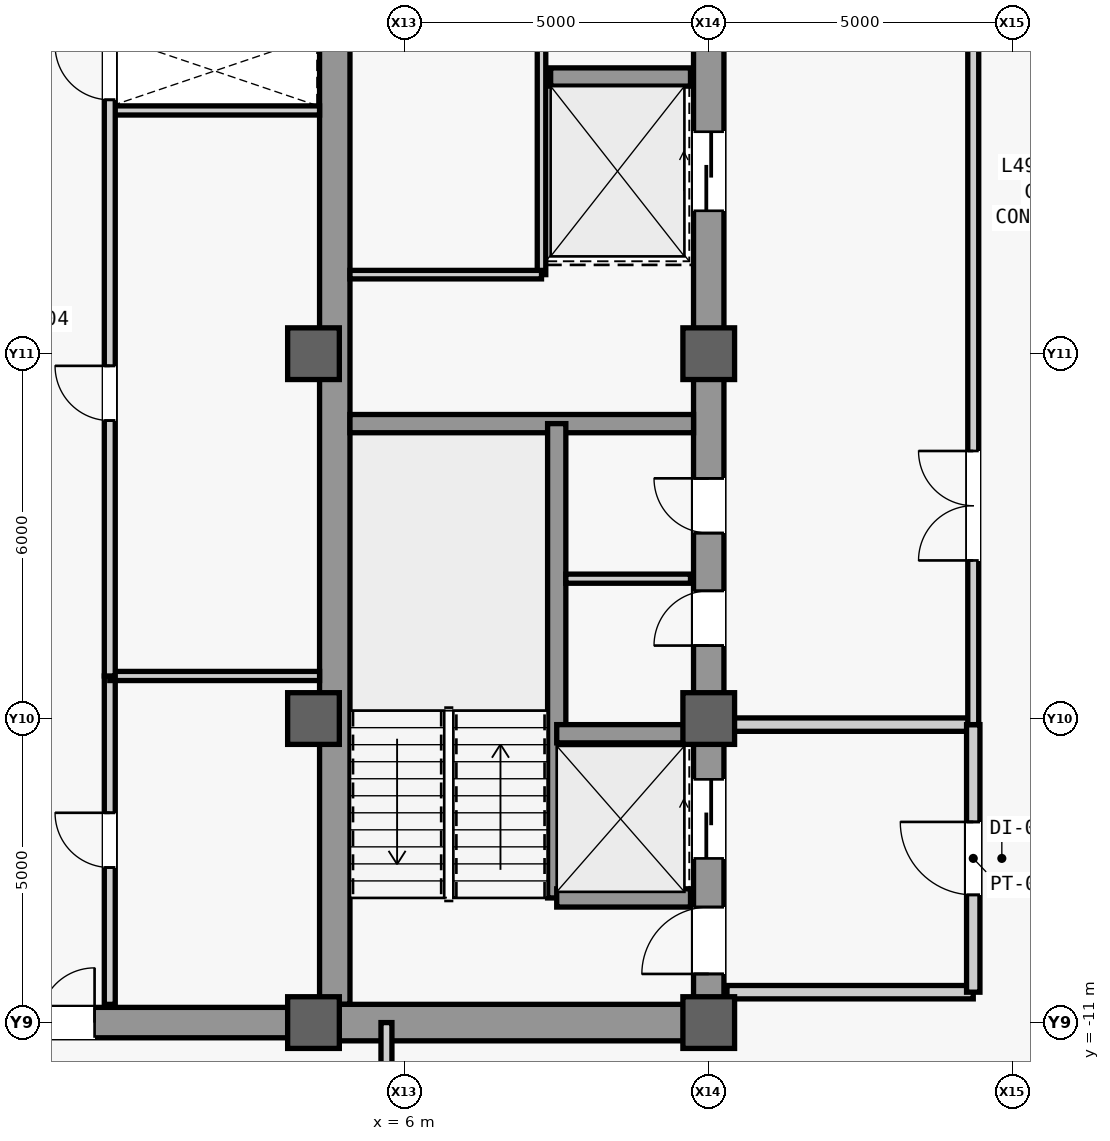
"""IFC4 building model, lengths in metres.
Left out: names, types, materials, properties, quantities, classifications, styles, units other than length and angle.
Written with IfcOpenShell. Run it as: python <this file> out.ifc"""

import sys

from ifc_helpers import new_model, si_unit, direction, frame, frame_2d, origin, origin_2d, place, context, subcontext, project, spatial, rectangle, extrude, source, transform, mapped, element, fill, save


model = new_model("IFC4")
c1 = context("Model", 3, precision=1e-05, world=origin(), true_north=direction((0.0, 1.0)))
c2 = subcontext(c1, "Body", "Model", "MODEL_VIEW")
j1 = project(units=[si_unit("LENGTHUNIT", "METRE"), si_unit("PLANEANGLEUNIT", "RADIAN")], contexts=[c1])
p1 = place(None, origin())
s1 = spatial("IfcSite", under=j1, at=p1, CompositionType="ELEMENT")
p2 = place(p1, origin())
s2 = spatial("IfcBuilding", under=s1, at=p2, CompositionType="ELEMENT")
p3 = place(p2, frame((0.0, 0.0, 211.1)))
s3 = spatial("IfcBuildingStorey", under=s2, at=p3, CompositionType="ELEMENT", Elevation=211.1)
m1 = source(origin(), c2, "Body", "SweptSolid", [
    extrude(rectangle(XDim=22.0, YDim=0.5, at=frame_2d((11.0, 0.0))), origin(), (0.0, 0.0, 1.0), 3.78),
])
p4 = place(p3, frame((11.0, -11.0, 0.0), z_axis=(0.0, 0.0, 1.0), x_axis=(0.0, 1.0, 0.0)))
e1 = element("IfcWall", 1, at=p4, inside=s3, PredefinedType="SHEAR", context=c2, shape_type="MappedRepresentation", body=[
    mapped(m1, transform((0.0, 0.0, 0.0), scale=1.0)),
])
m2 = source(origin(), c2, "Body", "SweptSolid", [
    extrude(rectangle(XDim=1.1, YDim=2.2, at=frame_2d((0.55, 1.1))), frame((0.0, 0.26, 0.0), z_axis=(0.0, -1.0, 0.0), x_axis=(1.0, 0.0, 0.0)), (0.0, 0.0, 1.0), 0.52),
])
p5 = place(p4, frame((0.8, 0.0, 0.0)))
e2 = element("IfcOpeningElement", 2, at=p5, cuts=e1, PredefinedType="OPENING", context=c2, shape_type="MappedRepresentation", body=[
    mapped(m2, transform((0.0, 0.0, 0.0), scale=1.0)),
])
m3 = source(origin(), c2, "Body", "SweptSolid", [
    extrude(rectangle(XDim=0.9, YDim=2.15, at=frame_2d((0.45, 1.075))), frame((0.0, 0.26, 0.0), z_axis=(0.0, -1.0, 0.0), x_axis=(1.0, 0.0, 0.0)), (0.0, 0.0, 1.0), 0.52),
])
p6 = place(p4, frame((6.2, 0.0, 0.0)))
e3 = element("IfcOpeningElement", 3, at=p6, cuts=e1, PredefinedType="OPENING", context=c2, shape_type="MappedRepresentation", body=[
    mapped(m3, transform((0.0, 0.0, 0.0), scale=1.0)),
])
p7 = place(p4, frame((8.05, 0.0, 0.0)))
e4 = element("IfcOpeningElement", 4, at=p7, cuts=e1, PredefinedType="OPENING", context=c2, shape_type="MappedRepresentation", body=[
    mapped(m3, transform((0.0, 0.0, 0.0), scale=1.0)),
])
m4 = source(origin(), c2, "Body", "SweptSolid", [
    extrude(rectangle(XDim=1.3, YDim=2.3, at=frame_2d((0.65, 1.15))), frame((0.0, 0.26, 0.0), z_axis=(0.0, -1.0, 0.0), x_axis=(1.0, 0.0, 0.0)), (0.0, 0.0, 1.0), 0.52),
])
p8 = place(p4, frame((2.7, 0.0, 0.0)))
e5 = element("IfcOpeningElement", 5, at=p8, cuts=e1, PredefinedType="OPENING", context=c2, shape_type="MappedRepresentation", body=[
    mapped(m4, transform((0.0, 0.0, 0.0), scale=1.0)),
])
p9 = place(p4, frame((13.35, 0.0, 0.0)))
e6 = element("IfcOpeningElement", 6, at=p9, cuts=e1, PredefinedType="OPENING", context=c2, shape_type="MappedRepresentation", body=[
    mapped(m4, transform((0.0, 0.0, 0.0), scale=1.0)),
])
m5 = source(origin(), c2, "Body", "SweptSolid", [
    extrude(rectangle(XDim=21.4, YDim=0.5, at=frame_2d((10.7, 0.0))), origin(), (0.0, 0.0, 1.0), 3.78),
])
p10 = place(p3, frame((4.85, -10.7, 0.0), z_axis=(0.0, 0.0, 1.0), x_axis=(0.0, 1.0, 0.0)))
e7 = element("IfcWall", 7, at=p10, inside=s3, PredefinedType="SHEAR", context=c2, shape_type="MappedRepresentation", body=[
    mapped(m5, transform((0.0, 0.0, 0.0), scale=1.0)),
])
m6 = source(origin(), c2, "Body", "SweptSolid", [
    extrude(rectangle(XDim=5.9, YDim=0.6, at=frame_2d((2.95, 0.0))), origin(), (0.0, 0.0, 1.0), 3.78),
])
p11 = place(p3, frame((4.85, -11.0, 0.0), z_axis=(0.0, 0.0, 1.0), x_axis=(1.0, 0.0, 0.0)))
e8 = element("IfcWall", 8, at=p11, inside=s3, PredefinedType="SHEAR", context=c2, shape_type="MappedRepresentation", body=[
    mapped(m6, transform((0.0, 0.0, 0.0), scale=1.0)),
])
m7 = source(origin(), c2, "Body", "SweptSolid", [
    extrude(rectangle(XDim=5.65, YDim=0.3, at=frame_2d((2.825, 0.0))), origin(), (0.0, 0.0, 1.0), 3.78),
])
p12 = place(p3, frame((5.1, -1.15, 0.0), z_axis=(0.0, 0.0, 1.0), x_axis=(1.0, 0.0, 0.0)))
e9 = element("IfcWall", 9, at=p12, inside=s3, PredefinedType="SHEAR", context=c2, shape_type="MappedRepresentation", body=[
    mapped(m7, transform((0.0, 0.0, 0.0), scale=1.0)),
])
m8 = source(origin(), c2, "Body", "SweptSolid", [
    extrude(rectangle(XDim=9.2, YDim=0.5, at=frame_2d((4.6, 0.0))), origin(), (0.0, 0.0, 1.0), 3.78),
])
p13 = place(p3, frame((-4.6, -11.0, 0.0), z_axis=(0.0, 0.0, 1.0), x_axis=(1.0, 0.0, 0.0)))
e10 = element("IfcWall", 10, at=p13, inside=s3, PredefinedType="SHEAR", context=c2, shape_type="MappedRepresentation", body=[
    mapped(m8, transform((0.0, 0.0, 0.0), scale=1.0)),
])
m9 = source(origin(), c2, "Body", "SweptSolid", [
    extrude(rectangle(XDim=1.8, YDim=2.25, at=frame_2d((0.9, 1.125))), frame((0.0, 0.26, 0.0), z_axis=(0.0, -1.0, 0.0), x_axis=(1.0, 0.0, 0.0)), (0.0, 0.0, 1.0), 0.52),
])
p14 = place(p13, frame((3.7, 0.0, 0.0)))
e11 = element("IfcOpeningElement", 11, at=p14, cuts=e10, PredefinedType="OPENING", context=c2, shape_type="MappedRepresentation", body=[
    mapped(m9, transform((0.0, 0.0, 0.0), scale=1.0)),
])
m10 = source(origin(), c2, "Body", "SweptSolid", [
    extrude(rectangle(XDim=0.85, YDim=0.85, at=origin_2d()), origin(), (0.0, 0.0, 1.0), 4.0),
])
for number, where, z_axis, x_axis in (
    (12, (4.5, -11.0, 0.0), (0.0, 0.0, 1.0), (1.0, 0.0, 0.0)),
    (13, (4.5, -6.0, 0.0), (0.0, 0.0, 1.0), (1.0, 0.0, 0.0)),
    (14, (4.5, 0.0, 0.0), (0.0, 0.0, 1.0), (1.0, 0.0, 0.0)),
    (15, (11.0, -11.0, 0.0), (0.0, 0.0, 1.0), (1.0, 0.0, 0.0)),
    (16, (11.0, -6.0, 0.0), (0.0, 0.0, 1.0), (1.0, 0.0, 0.0)),
    (17, (11.0, 0.0, 0.0), (0.0, 0.0, 1.0), (1.0, 0.0, 0.0)),
):
    element("IfcColumn", number, at=place(p3, frame(where, z_axis=z_axis, x_axis=x_axis)), inside=s3, PredefinedType="COLUMN", context=c2, shape_type="MappedRepresentation", body=[
        mapped(m10, transform((0.0, 0.0, 0.0), scale=1.0)),
    ])
m11 = source(origin(), c2, "Body", "SweptSolid", [
    extrude(rectangle(XDim=7.8, YDim=0.3, at=frame_2d((3.9, 0.0))), origin(), (0.0, 0.0, 1.0), 3.78),
])
p15 = place(p3, frame((8.5, -8.95, 0.0), z_axis=(0.0, 0.0, 1.0), x_axis=(0.0, 1.0, 0.0)))
e18 = element("IfcWall", 18, at=p15, inside=s3, PredefinedType="SHEAR", context=c2, shape_type="MappedRepresentation", body=[
    mapped(m11, transform((0.0, 0.0, 0.0), scale=1.0)),
])
m12 = source(origin(), c2, "Body", "SweptSolid", [
    extrude(rectangle(XDim=2.2, YDim=0.3, at=frame_2d((1.1, 0.0))), origin(), (0.0, 0.0, 1.0), 3.78),
])
for number, where, z_axis, x_axis in (
    (19, (8.5, -8.95, 0.0), (0.0, 0.0, 1.0), (1.0, 0.0, 0.0)),
    (20, (8.5, -6.25, 0.0), (0.0, 0.0, 1.0), (1.0, 0.0, 0.0)),
):
    element("IfcWall", number, at=place(p3, frame(where, z_axis=z_axis, x_axis=x_axis)), inside=s3, PredefinedType="SHEAR", context=c2, shape_type="MappedRepresentation", body=[
        mapped(m12, transform((0.0, 0.0, 0.0), scale=1.0)),
    ])
m13 = source(origin(), c2, "Body", "SweptSolid", [
    extrude(rectangle(XDim=2.3, YDim=0.3, at=frame_2d((1.15, 0.0))), origin(), (0.0, 0.0, 1.0), 3.78),
])
p16 = place(p3, frame((8.4, 4.55, 0.0), z_axis=(0.0, 0.0, 1.0), x_axis=(1.0, 0.0, 0.0)))
e21 = element("IfcWall", 21, at=p16, inside=s3, PredefinedType="SHEAR", context=c2, shape_type="MappedRepresentation", body=[
    mapped(m13, transform((0.0, 0.0, 0.0), scale=1.0)),
])
m14 = source(origin(), c2, "Body", "SweptSolid", [
    extrude(rectangle(XDim=2.05, YDim=0.15, at=frame_2d((1.025, 0.0))), origin(), (0.0, 0.0, 1.0), 3.78),
])
p17 = place(p3, frame((8.65, -3.7, 0.0), z_axis=(0.0, 0.0, 1.0), x_axis=(1.0, 0.0, 0.0)))
e22 = element("IfcWall", 22, at=p17, inside=s3, PredefinedType="PARTITIONING", context=c2, shape_type="MappedRepresentation", body=[
    mapped(m14, transform((0.0, 0.0, 0.0), scale=1.0)),
])
m15 = source(origin(), c2, "Body", "SweptSolid", [
    extrude(rectangle(XDim=9.4, YDim=0.14, at=frame_2d((4.7, 0.0))), origin(), (0.0, 0.0, 1.0), 3.78),
])
p18 = place(p3, frame((8.25, 1.3, 0.0), z_axis=(0.0, 0.0, 1.0), x_axis=(0.0, 1.0, 0.0)))
e23 = element("IfcWall", 23, at=p18, inside=s3, PredefinedType="PARTITIONING", context=c2, shape_type="MappedRepresentation", body=[
    mapped(m15, transform((0.0, 0.0, 0.0), scale=1.0)),
])
m16 = source(origin(), c2, "Body", "SweptSolid", [
    extrude(rectangle(XDim=3.15, YDim=0.14, at=frame_2d((1.575, 0.0))), origin(), (0.0, 0.0, 1.0), 3.78),
])
p19 = place(p3, frame((5.1, 1.3, 0.0), z_axis=(0.0, 0.0, 1.0), x_axis=(1.0, 0.0, 0.0)))
e24 = element("IfcWall", 24, at=p19, inside=s3, PredefinedType="PARTITIONING", context=c2, shape_type="MappedRepresentation", body=[
    mapped(m16, transform((0.0, 0.0, 0.0), scale=1.0)),
])
m17 = source(origin(), c2, "Body", "SweptSolid", [
    extrude(rectangle(XDim=4.05, YDim=0.22, at=frame_2d((2.025, 0.0))), origin(), (0.0, 0.0, 1.0), 3.78),
])
p20 = place(p3, frame((11.3, -10.5, 0.0), z_axis=(0.0, 0.0, 1.0), x_axis=(1.0, 0.0, 0.0)))
e25 = element("IfcWall", 25, at=p20, inside=s3, PredefinedType="PARTITIONING", context=c2, shape_type="MappedRepresentation", body=[
    mapped(m17, transform((0.0, 0.0, 0.0), scale=1.0)),
])
m18 = source(origin(), c2, "Body", "SweptSolid", [
    extrude(rectangle(XDim=4.05, YDim=0.22, at=frame_2d((2.025, 0.0))), origin(), (0.0, 0.0, 1.0), 3.085),
])
p21 = place(p3, frame((11.3, -6.1, 0.0), z_axis=(0.0, 0.0, 1.0), x_axis=(1.0, 0.0, 0.0)))
e26 = element("IfcWall", 26, at=p21, inside=s3, PredefinedType="PARTITIONING", context=c2, shape_type="MappedRepresentation", body=[
    mapped(m18, transform((0.0, 0.0, 0.0), scale=1.0)),
])
m19 = source(origin(), c2, "Body", "SweptSolid", [
    extrude(rectangle(XDim=4.4, YDim=0.22, at=frame_2d((2.2, 0.0))), origin(), (0.0, 0.0, 1.0), 3.78),
])
p22 = place(p3, frame((15.35, -10.5, 0.0), z_axis=(0.0, 0.0, 1.0), x_axis=(0.0, 1.0, 0.0)))
e27 = element("IfcWall", 27, at=p22, inside=s3, PredefinedType="PARTITIONING", context=c2, shape_type="MappedRepresentation", body=[
    mapped(m19, transform((0.0, 0.0, 0.0), scale=1.0)),
])
m20 = source(origin(), c2, "Body", "SweptSolid", [
    extrude(rectangle(XDim=1.2, YDim=2.2, at=frame_2d((0.6, 1.1))), frame((0.0, 0.12, 0.0), z_axis=(0.0, -1.0, 0.0), x_axis=(1.0, 0.0, 0.0)), (0.0, 0.0, 1.0), 0.24),
])
p23 = place(p22, frame((1.6, 0.0, 0.0)))
e28 = element("IfcOpeningElement", 28, at=p23, cuts=e27, PredefinedType="OPENING", context=c2, shape_type="MappedRepresentation", body=[
    mapped(m20, transform((0.0, 0.0, 0.0), scale=1.0)),
])
m21 = source(origin(), c2, "Body", "SweptSolid", [
    extrude(rectangle(XDim=16.6, YDim=0.18, at=frame_2d((8.3, 0.0))), origin(), (0.0, 0.0, 1.0), 3.78),
])
p24 = place(p3, frame((15.35, -6.1, 0.0), z_axis=(0.0, 0.0, 1.0), x_axis=(0.0, 1.0, 0.0)))
e29 = element("IfcWall", 29, at=p24, inside=s3, PredefinedType="PARTITIONING", context=c2, shape_type="MappedRepresentation", body=[
    mapped(m21, transform((0.0, 0.0, 0.0), scale=1.0)),
])
m22 = source(origin(), c2, "Body", "SweptSolid", [
    extrude(rectangle(XDim=1.8, YDim=2.25, at=frame_2d((0.9, 1.125))), frame((0.0, 0.1, 0.0), z_axis=(0.0, -1.0, 0.0), x_axis=(1.0, 0.0, 0.0)), (0.0, 0.0, 1.0), 0.2),
])
p25 = place(p24, frame((2.7, 0.0, 0.0)))
e30 = element("IfcOpeningElement", 30, at=p25, cuts=e29, PredefinedType="OPENING", context=c2, shape_type="MappedRepresentation", body=[
    mapped(m22, transform((0.0, 0.0, 0.0), scale=1.0)),
])
p26 = place(p24, frame((13.0, 0.0, 0.0)))
e31 = element("IfcOpeningElement", 31, at=p26, cuts=e29, PredefinedType="OPENING", context=c2, shape_type="MappedRepresentation", body=[
    mapped(m22, transform((0.0, 0.0, 0.0), scale=1.0)),
])
m23 = source(origin(), c2, "Body", "SweptSolid", [
    extrude(rectangle(XDim=3.45, YDim=0.15, at=frame_2d((1.725, 0.0))), origin(), (0.0, 0.0, 1.0), 3.78),
])
p27 = place(p3, frame((1.15, 4.0, 0.0), z_axis=(0.0, 0.0, 1.0), x_axis=(1.0, 0.0, 0.0)))
e32 = element("IfcWall", 32, at=p27, inside=s3, PredefinedType="PARTITIONING", context=c2, shape_type="MappedRepresentation", body=[
    mapped(m23, transform((0.0, 0.0, 0.0), scale=1.0)),
])
m24 = source(origin(), c2, "Body", "SweptSolid", [
    extrude(rectangle(XDim=5.4, YDim=0.18, at=frame_2d((2.7, 0.0))), origin(), (0.0, 0.0, 1.0), 3.78),
])
p28 = place(p3, frame((1.15, -10.7, 0.0), z_axis=(0.0, 0.0, 1.0), x_axis=(0.0, 1.0, 0.0)))
e33 = element("IfcWall", 33, at=p28, inside=s3, PredefinedType="PARTITIONING", context=c2, shape_type="MappedRepresentation", body=[
    mapped(m24, transform((0.0, 0.0, 0.0), scale=1.0)),
])
m25 = source(origin(), c2, "Body", "SweptSolid", [
    extrude(rectangle(XDim=0.9, YDim=2.15, at=frame_2d((0.45, 1.075))), frame((0.0, 0.1, 0.0), z_axis=(0.0, -1.0, 0.0), x_axis=(1.0, 0.0, 0.0)), (0.0, 0.0, 1.0), 0.2),
])
p29 = place(p28, frame((2.25, 0.0, 0.0)))
e34 = element("IfcOpeningElement", 34, at=p29, cuts=e33, PredefinedType="OPENING", context=c2, shape_type="MappedRepresentation", body=[
    mapped(m25, transform((0.0, 0.0, 0.0), scale=1.0)),
])
p30 = place(p3, frame((1.15, -5.3, 0.0), z_axis=(0.0, 0.0, 1.0), x_axis=(1.0, 0.0, 0.0)))
e35 = element("IfcWall", 35, at=p30, inside=s3, PredefinedType="PARTITIONING", context=c2, shape_type="MappedRepresentation", body=[
    mapped(m23, transform((0.0, 0.0, 0.0), scale=1.0)),
])
m26 = source(origin(), c2, "Body", "SweptSolid", [
    extrude(rectangle(XDim=10.6, YDim=0.18, at=frame_2d((5.3, 0.0))), origin(), (0.0, 0.0, 1.0), 3.78),
])
p31 = place(p3, frame((1.15, -5.3, 0.0), z_axis=(0.0, 0.0, 1.0), x_axis=(0.0, 1.0, 0.0)))
e36 = element("IfcWall", 36, at=p31, inside=s3, PredefinedType="PARTITIONING", context=c2, shape_type="MappedRepresentation", body=[
    mapped(m26, transform((0.0, 0.0, 0.0), scale=1.0)),
])
p32 = place(p31, frame((4.2, 0.0, 0.0)))
e37 = element("IfcOpeningElement", 37, at=p32, cuts=e36, PredefinedType="OPENING", context=c2, shape_type="MappedRepresentation", body=[
    mapped(m25, transform((0.0, 0.0, 0.0), scale=1.0)),
])
p33 = place(p31, frame((9.475, 0.0, 0.0)))
e38 = element("IfcOpeningElement", 38, at=p33, cuts=e36, PredefinedType="OPENING", context=c2, shape_type="MappedRepresentation", body=[
    mapped(m25, transform((0.0, 0.0, 0.0), scale=1.0)),
])
m27 = source(origin(), c2, "Body", "SweptSolid", [
    extrude(rectangle(XDim=3.2, YDim=0.18, at=frame_2d((1.6, 0.0))), origin(), (0.0, 0.0, 1.0), 3.085),
])
p34 = place(p3, frame((5.7, -14.2, 0.0), z_axis=(0.0, 0.0, 1.0), x_axis=(0.0, 1.0, 0.0)))
e39 = element("IfcWall", 39, at=p34, inside=s3, PredefinedType="PARTITIONING", context=c2, shape_type="MappedRepresentation", body=[
    mapped(m27, transform((0.0, 0.0, 0.0), scale=1.0)),
])
m28 = source(origin(), c2, "Body", "SweptSolid", [
    extrude(rectangle(XDim=1.1, YDim=2.2, at=frame_2d((0.55, 1.1))), frame((0.0, 0.025, 0.0), z_axis=(0.0, -1.0, 0.0), x_axis=(1.0, 0.0, 0.0)), (0.0, 0.0, 1.0), 0.05),
])
p35 = place(p5, origin())
e40 = element("IfcDoor", 40, at=p35, inside=s3, OperationType="SINGLE_SWING_LEFT", PredefinedType="DOOR", context=c2, shape_type="MappedRepresentation", body=[
    mapped(m28, transform((0.0, 0.0, 0.0), scale=1.0)),
])
fill(e2, e40)
m29 = source(origin(), c2, "Body", "SweptSolid", [
    extrude(rectangle(XDim=0.9, YDim=2.15, at=frame_2d((0.45, 1.075))), frame((0.0, 0.025, 0.0), z_axis=(0.0, -1.0, 0.0), x_axis=(1.0, 0.0, 0.0)), (0.0, 0.0, 1.0), 0.05),
])
p36 = place(p6, origin())
e41 = element("IfcDoor", 41, at=p36, inside=s3, OperationType="SINGLE_SWING_LEFT", PredefinedType="DOOR", context=c2, shape_type="MappedRepresentation", body=[
    mapped(m29, transform((0.0, 0.0, 0.0), scale=1.0)),
])
fill(e3, e41)
p37 = place(p7, origin())
e42 = element("IfcDoor", 42, at=p37, inside=s3, OperationType="SINGLE_SWING_RIGHT", PredefinedType="DOOR", context=c2, shape_type="MappedRepresentation", body=[
    mapped(m29, transform((0.0, 0.0, 0.0), scale=1.0)),
])
fill(e4, e42)
m30 = source(origin(), c2, "Body", "SweptSolid", [
    extrude(rectangle(XDim=1.2, YDim=2.2, at=frame_2d((0.6, 1.1))), frame((0.0, 0.025, 0.0), z_axis=(0.0, -1.0, 0.0), x_axis=(1.0, 0.0, 0.0)), (0.0, 0.0, 1.0), 0.05),
])
p38 = place(p23, origin())
e43 = element("IfcDoor", 43, at=p38, inside=s3, OperationType="SINGLE_SWING_RIGHT", PredefinedType="DOOR", context=c2, shape_type="MappedRepresentation", body=[
    mapped(m30, transform((0.0, 0.0, 0.0), scale=1.0)),
])
fill(e28, e43)
m31 = source(origin(), c2, "Body", "SweptSolid", [
    extrude(rectangle(XDim=1.8, YDim=2.25, at=frame_2d((0.9, 1.125))), frame((0.0, 0.025, 0.0), z_axis=(0.0, -1.0, 0.0), x_axis=(1.0, 0.0, 0.0)), (0.0, 0.0, 1.0), 0.05),
])
p39 = place(p25, origin())
e44 = element("IfcDoor", 44, at=p39, inside=s3, OperationType="SINGLE_SWING_RIGHT", PredefinedType="DOOR", context=c2, shape_type="MappedRepresentation", body=[
    mapped(m31, transform((0.0, 0.0, 0.0), scale=1.0)),
])
fill(e30, e44)
p40 = place(p29, origin())
e45 = element("IfcDoor", 45, at=p40, inside=s3, OperationType="SINGLE_SWING_RIGHT", PredefinedType="DOOR", context=c2, shape_type="MappedRepresentation", body=[
    mapped(m29, transform((0.0, 0.0, 0.0), scale=1.0)),
])
fill(e34, e45)
p41 = place(p14, origin())
e46 = element("IfcDoor", 46, at=p41, inside=s3, OperationType="SINGLE_SWING_LEFT", PredefinedType="DOOR", context=c2, shape_type="MappedRepresentation", body=[
    mapped(m31, transform((0.0, 0.0, 0.0), scale=1.0)),
])
fill(e11, e46)
p42 = place(p32, origin())
e47 = element("IfcDoor", 47, at=p42, inside=s3, OperationType="SINGLE_SWING_RIGHT", PredefinedType="DOOR", context=c2, shape_type="MappedRepresentation", body=[
    mapped(m29, transform((0.0, 0.0, 0.0), scale=1.0)),
])
fill(e37, e47)
p43 = place(p33, origin())
e48 = element("IfcDoor", 48, at=p43, inside=s3, OperationType="SINGLE_SWING_RIGHT", PredefinedType="DOOR", context=c2, shape_type="MappedRepresentation", body=[
    mapped(m29, transform((0.0, 0.0, 0.0), scale=1.0)),
])
fill(e38, e48)
m32 = source(origin(), c2, "Body", "SweptSolid", [
    extrude(rectangle(XDim=1.3, YDim=2.3, at=frame_2d((0.65, 1.15))), frame((0.0, 0.025, 0.0), z_axis=(0.0, -1.0, 0.0), x_axis=(1.0, 0.0, 0.0)), (0.0, 0.0, 1.0), 0.05),
])
p44 = place(p8, origin())
e49 = element("IfcDoor", 49, at=p44, inside=s3, OperationType="SLIDING_TO_LEFT", PredefinedType="DOOR", context=c2, shape_type="MappedRepresentation", body=[
    mapped(m32, transform((0.0, 0.0, 0.0), scale=1.0)),
])
fill(e5, e49)
p45 = place(p9, origin())
e50 = element("IfcDoor", 50, at=p45, inside=s3, OperationType="SLIDING_TO_LEFT", PredefinedType="DOOR", context=c2, shape_type="MappedRepresentation", body=[
    mapped(m32, transform((0.0, 0.0, 0.0), scale=1.0)),
])
fill(e6, e50)
save(model, sys.argv[1])
